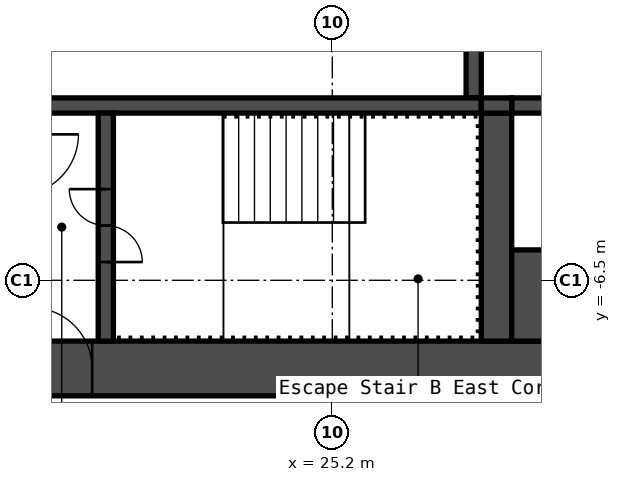
"""IFC4 building model, lengths in metres.
Left out: names, types, materials, properties, quantities, classifications, styles, units other than length and angle.
Written with IfcOpenShell. Run it as: python <this file> out.ifc"""

import sys

from ifc_helpers import new_model, si_unit, direction, frame, frame_2d, origin, place, context, subcontext, project, spatial, rectangle, extrude, element, fill, save


model = new_model("IFC4")
c1 = context("Model", 3, precision=1e-05, world=origin(), true_north=direction((0.0, 1.0)))
c2 = subcontext(c1, "Body", "Model", "MODEL_VIEW")
j1 = project(units=[si_unit("LENGTHUNIT", "METRE"), si_unit("PLANEANGLEUNIT", "RADIAN")], contexts=[c1])
p1 = place(None, origin())
s1 = spatial("IfcSite", under=j1, at=p1, CompositionType="ELEMENT")
p2 = place(p1, origin())
s2 = spatial("IfcBuilding", under=s1, at=p2, CompositionType="ELEMENT")
p3 = place(p2, frame((0.0, 0.0, 140.6)))
s3 = spatial("IfcBuildingStorey", under=s2, at=p3, CompositionType="ELEMENT", Elevation=140.6)
p4 = place(p3, frame((17.7, -7.95, 0.0), z_axis=(0.0, 0.0, 1.0), x_axis=(1.0, 0.0, 0.0)))
e1 = element("IfcWall", 1, at=p4, inside=s3, PredefinedType="SHEAR", context=c2, shape_type="SweptSolid", body=[
    extrude(rectangle(XDim=15.0, YDim=0.9, at=frame_2d((7.5, 0.0))), origin(), (0.0, 0.0, 1.0), 2.75),
])
p5 = place(p4, frame((2.55, 0.0, 0.0)))
e2 = element("IfcOpeningElement", 2, at=p5, cuts=e1, PredefinedType="OPENING", context=c2, shape_type="SweptSolid", body=[
    extrude(rectangle(XDim=1.0, YDim=2.1, at=frame_2d((0.5, 1.05))), frame((0.0, 0.46, 0.0), z_axis=(0.0, -1.0, 0.0), x_axis=(1.0, 0.0, 0.0)), (0.0, 0.0, 1.0), 0.92),
])
p6 = place(p3, frame((27.525, -3.5, 0.0), z_axis=(0.0, 0.0, 1.0), x_axis=(0.0, 1.0, 0.0)))
e3 = element("IfcWall", 3, at=p6, inside=s3, PredefinedType="SHEAR", context=c2, shape_type="SweptSolid", body=[
    extrude(rectangle(XDim=2.05, YDim=0.25, at=frame_2d((1.025, 0.0))), origin(), (0.0, 0.0, 1.0), 2.75),
])
p7 = place(p3, frame((20.15, -3.625, 0.0), z_axis=(0.0, 0.0, 1.0), x_axis=(1.0, 0.0, 0.0)))
e4 = element("IfcWall", 4, at=p7, inside=s3, PredefinedType="SHEAR", context=c2, shape_type="SweptSolid", body=[
    extrude(rectangle(XDim=7.5, YDim=0.25, at=frame_2d((3.75, 0.0))), origin(), (0.0, 0.0, 1.0), 2.75),
])
p8 = place(p3, frame((21.475, -7.5, 0.0), z_axis=(0.0, 0.0, 1.0), x_axis=(0.0, 1.0, 0.0)))
e5 = element("IfcWall", 5, at=p8, inside=s3, PredefinedType="SHEAR", context=c2, shape_type="SweptSolid", body=[
    extrude(rectangle(XDim=3.75, YDim=0.25, at=frame_2d((1.875, 0.0))), origin(), (0.0, 0.0, 1.0), 2.75),
])
p9 = place(p8, frame((1.3, 0.0, 0.0)))
e6 = element("IfcOpeningElement", 6, at=p9, cuts=e5, PredefinedType="OPENING", context=c2, shape_type="SweptSolid", body=[
    extrude(rectangle(XDim=1.2, YDim=2.1, at=frame_2d((0.6, 1.05))), frame((0.0, 0.135, 0.0), z_axis=(0.0, -1.0, 0.0), x_axis=(1.0, 0.0, 0.0)), (0.0, 0.0, 1.0), 0.27),
])
p10 = place(p3, frame((27.9, -7.5, 0.0), z_axis=(0.0, 0.0, 1.0), x_axis=(0.0, 1.0, 0.0)))
e7 = element("IfcWall", 7, at=p10, inside=s3, PredefinedType="SHEAR", context=c2, shape_type="SweptSolid", body=[
    extrude(rectangle(XDim=3.75, YDim=0.5, at=frame_2d((1.875, 0.0))), origin(), (0.0, 0.0, 1.0), 2.75),
])
p11 = place(p3, frame((28.15, -3.625, 0.0), z_axis=(0.0, 0.0, 1.0), x_axis=(1.0, 0.0, 0.0)))
e8 = element("IfcWall", 8, at=p11, inside=s3, PredefinedType="SHEAR", context=c2, shape_type="SweptSolid", body=[
    extrude(rectangle(XDim=4.55, YDim=0.25, at=frame_2d((2.275, 0.0))), origin(), (0.0, 0.0, 1.0), 2.75),
])
p12 = place(p3, frame((28.15, -6.75, 0.0), z_axis=(0.0, 0.0, 1.0), x_axis=(1.0, 0.0, 0.0)))
e9 = element("IfcWall", 9, at=p12, inside=s3, PredefinedType="SHEAR", context=c2, shape_type="SweptSolid", body=[
    extrude(rectangle(XDim=4.55, YDim=1.5, at=frame_2d((2.275, 0.0))), origin(), (0.0, 0.0, 1.0), 2.75),
])
p13 = place(p3, frame((27.65, -3.625, 0.0), z_axis=(0.0, 0.0, 1.0), x_axis=(1.0, 0.0, 0.0)))
e10 = element("IfcWall", 10, at=p13, inside=s3, PredefinedType="SHEAR", context=c2, shape_type="SweptSolid", body=[
    extrude(rectangle(XDim=0.5, YDim=0.25, at=frame_2d((0.25, 0.0))), origin(), (0.0, 0.0, 1.0), 2.75),
])
p14 = place(p5, origin())
e11 = element("IfcDoor", 11, at=p14, inside=s3, OperationType="SINGLE_SWING_RIGHT", PredefinedType="DOOR", context=c2, shape_type="SweptSolid", body=[
    extrude(rectangle(XDim=1.0, YDim=2.1, at=frame_2d((0.5, 1.05))), frame((0.0, 0.025, 0.0), z_axis=(0.0, -1.0, 0.0), x_axis=(1.0, 0.0, 0.0)), (0.0, 0.0, 1.0), 0.05),
])
fill(e2, e11)
p15 = place(p9, origin())
e12 = element("IfcDoor", 12, at=p15, inside=s3, OperationType="DOUBLE_DOOR_SINGLE_SWING", PredefinedType="DOOR", context=c2, shape_type="SweptSolid", body=[
    extrude(rectangle(XDim=1.2, YDim=2.1, at=frame_2d((0.6, 1.05))), frame((0.0, 0.025, 0.0), z_axis=(0.0, -1.0, 0.0), x_axis=(1.0, 0.0, 0.0)), (0.0, 0.0, 1.0), 0.05),
])
fill(e6, e12)
save(model, sys.argv[1])
